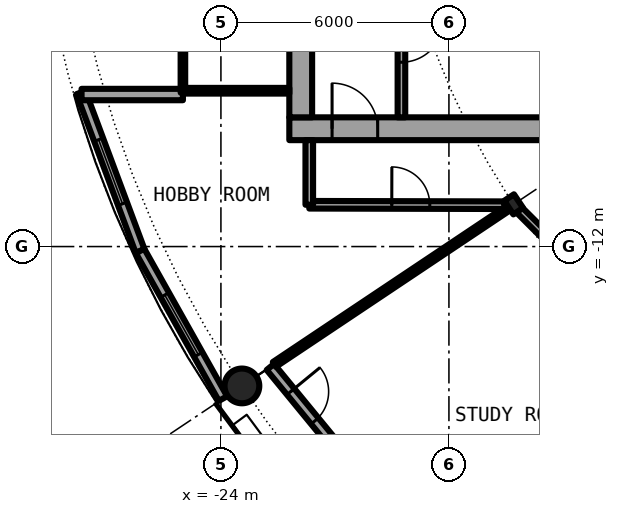
"""IFC4 building model, lengths in metres.
Left out: names, types, materials, properties, quantities, classifications, styles, units other than length and angle.
Written with IfcOpenShell. Run it as: python <this file> out.ifc"""

import sys

from ifc_helpers import new_model, si_unit, direction, frame, frame_2d, origin, origin_2d, place, context, subcontext, project, spatial, rectangle, hollow_circle, i_section, extrude, element, fill, save


model = new_model("IFC4")
c1 = context("Model", 3, precision=1e-05, world=origin(), true_north=direction((0.0, 1.0)))
c2 = subcontext(c1, "Body", "Model", "MODEL_VIEW")
j1 = project(units=[si_unit("LENGTHUNIT", "METRE"), si_unit("PLANEANGLEUNIT", "RADIAN")], contexts=[c1])
p1 = place(None, origin())
s1 = spatial("IfcSite", under=j1, at=p1, CompositionType="ELEMENT")
p2 = place(p1, origin())
s2 = spatial("IfcBuilding", under=s1, at=p2, CompositionType="ELEMENT")
p3 = place(p2, frame((0.0, 0.0, 107.45)))
s3 = spatial("IfcBuildingStorey", under=s2, at=p3, CompositionType="ELEMENT", Elevation=107.45)
p4 = place(p3, frame((-23.448, -15.667, 0.0), z_axis=(0.0, 0.0, 1.0), x_axis=(1.0, 0.0, 0.0)))
e1 = element("IfcColumn", 1, at=p4, inside=s3, PredefinedType="COLUMN", context=c2, shape_type="SweptSolid", body=[
    extrude(hollow_circle(Radius=0.457, WallThickness=0.04, at=origin_2d()), origin(), (0.0, 0.0, 1.0), 4.2),
])
p5 = place(p3, frame((-16.297, -10.889, 0.0), z_axis=(0.0, 0.0, 1.0), x_axis=(-0.831469612303, -0.55557023302, 0.0)))
e2 = element("IfcColumn", 2, at=p5, inside=s3, PredefinedType="COLUMN", context=c2, shape_type="SweptSolid", body=[
    extrude(i_section(OverallWidth=0.307, OverallDepth=0.432, WebThickness=0.021, FlangeThickness=0.04, FilletRadius=0.027, at=origin_2d()), origin(), (0.0, 0.0, 1.0), 4.2),
])
p6 = place(p3, frame((-22.699, -15.167, 0.0), z_axis=(0.0, 0.0, 1.0), x_axis=(0.634382322723, -0.773019449054, 0.0)))
e3 = element("IfcWall", 3, at=p6, inside=s3, PredefinedType="SOLIDWALL", context=c2, shape_type="SweptSolid", body=[
    extrude(rectangle(XDim=5.352, YDim=0.25, at=frame_2d((2.676, 0.0))), origin(), (0.0, 0.0, 1.0), 3.85),
])
p7 = place(p6, frame((0.841, 0.0, 0.0)))
e4 = element("IfcOpeningElement", 4, at=p7, cuts=e3, PredefinedType="OPENING", context=c2, shape_type="SweptSolid", body=[
    extrude(rectangle(XDim=1.0, YDim=2.2, at=frame_2d((0.5, 1.1))), frame((0.0, 0.135, 0.0), z_axis=(0.0, -1.0, 0.0), x_axis=(1.0, 0.0, 0.0)), (0.0, 0.0, 1.0), 0.27),
])
p8 = place(p6, frame((3.51, 0.0, 0.0)))
e5 = element("IfcOpeningElement", 5, at=p8, cuts=e3, PredefinedType="OPENING", context=c2, shape_type="SweptSolid", body=[
    extrude(rectangle(XDim=1.0, YDim=2.2, at=frame_2d((0.5, 1.1))), frame((0.0, 0.135, 0.0), z_axis=(0.0, -1.0, 0.0), x_axis=(1.0, 0.0, 0.0)), (0.0, 0.0, 1.0), 0.27),
])
p9 = place(p3, frame((-27.682, -7.945, 0.0), z_axis=(0.0, 0.0, 1.0), x_axis=(0.349247811493, -0.937030397675, 0.0)))
e6 = element("IfcWall", 6, at=p9, inside=s3, PredefinedType="SOLIDWALL", context=c2, shape_type="SweptSolid", body=[
    extrude(rectangle(XDim=4.452, YDim=0.25, at=frame_2d((2.226, 0.0))), origin(), (0.0, 0.0, 1.0), 3.85),
])
p10 = place(p9, frame((1.327, 0.0, 0.3)))
e7 = element("IfcOpeningElement", 7, at=p10, cuts=e6, PredefinedType="OPENING", context=c2, shape_type="SweptSolid", body=[
    extrude(rectangle(XDim=1.8, YDim=2.1, at=frame_2d((0.9, 1.05))), frame((0.0, 0.135, 0.0), z_axis=(0.0, -1.0, 0.0), x_axis=(1.0, 0.0, 0.0)), (0.0, 0.0, 1.0), 0.27),
])
p11 = place(p3, frame((-26.127, -12.117, 0.0), z_axis=(0.0, 0.0, 1.0), x_axis=(0.489696356642, -0.871893042919, 0.0)))
e8 = element("IfcWall", 8, at=p11, inside=s3, PredefinedType="SOLIDWALL", context=c2, shape_type="SweptSolid", body=[
    extrude(rectangle(XDim=4.454, YDim=0.25, at=frame_2d((2.227, 0.0))), origin(), (0.0, 0.0, 1.0), 3.85),
])
p12 = place(p11, frame((1.327, 0.0, 0.3)))
e9 = element("IfcOpeningElement", 9, at=p12, cuts=e8, PredefinedType="OPENING", context=c2, shape_type="SweptSolid", body=[
    extrude(rectangle(XDim=1.8, YDim=2.1, at=frame_2d((0.9, 1.05))), frame((0.0, 0.135, 0.0), z_axis=(0.0, -1.0, 0.0), x_axis=(1.0, 0.0, 0.0)), (0.0, 0.0, 1.0), 0.27),
])
p13 = place(p3, frame((-25.0, -8.0, 0.0), z_axis=(0.0, 0.0, 1.0), x_axis=(-1.0, 0.0, 0.0)))
e10 = element("IfcWall", 10, at=p13, inside=s3, PredefinedType="SOLIDWALL", context=c2, shape_type="SweptSolid", body=[
    extrude(rectangle(XDim=2.667, YDim=0.3, at=frame_2d((1.333, 0.0))), origin(), (0.0, 0.0, 1.0), 3.85),
])
p14 = place(p3, frame((-22.2, -8.9, 0.0), z_axis=(0.0, 0.0, 1.0), x_axis=(1.0, 0.0, 0.0)))
e11 = element("IfcWall", 11, at=p14, inside=s3, PredefinedType="SHEAR", context=c2, shape_type="SweptSolid", body=[
    extrude(rectangle(XDim=13.8, YDim=0.6, at=frame_2d((6.9, 0.0))), origin(), (0.0, 0.0, 1.0), 4.2),
])
p15 = place(p14, frame((1.125, 0.0, 0.0)))
e12 = element("IfcOpeningElement", 12, at=p15, cuts=e11, PredefinedType="OPENING", context=c2, shape_type="SweptSolid", body=[
    extrude(rectangle(XDim=1.2, YDim=2.3, at=frame_2d((0.6, 1.15))), frame((0.0, 0.31, 0.0), z_axis=(0.0, -1.0, 0.0), x_axis=(1.0, 0.0, 0.0)), (0.0, 0.0, 1.0), 0.62),
])
p16 = place(p3, frame((-21.9, -8.6, 0.0), z_axis=(0.0, 0.0, 1.0), x_axis=(0.0, 1.0, 0.0)))
e13 = element("IfcWall", 13, at=p16, inside=s3, PredefinedType="SHEAR", context=c2, shape_type="SweptSolid", body=[
    extrude(rectangle(XDim=17.2, YDim=0.6, at=frame_2d((8.6, 0.0))), origin(), (0.0, 0.0, 1.0), 4.2),
])
p17 = place(p16, frame((7.7, 0.0, 0.0)))
e14 = element("IfcOpeningElement", 14, at=p17, cuts=e13, PredefinedType="OPENING", context=c2, shape_type="SweptSolid", body=[
    extrude(rectangle(XDim=1.8, YDim=2.3, at=frame_2d((0.9, 1.15))), frame((0.0, 0.31, 0.0), z_axis=(0.0, -1.0, 0.0), x_axis=(1.0, 0.0, 0.0)), (0.0, 0.0, 1.0), 0.62),
])
p18 = place(p3, frame((-19.25, -1.575, 0.0), z_axis=(0.0, 0.0, 1.0), x_axis=(0.0, -1.0, 0.0)))
e15 = element("IfcWall", 15, at=p18, inside=s3, PredefinedType="SOLIDWALL", context=c2, shape_type="SweptSolid", body=[
    extrude(rectangle(XDim=7.025, YDim=0.2, at=frame_2d((3.513, 0.0))), origin(), (0.0, 0.0, 1.0), 3.85),
])
p19 = place(p18, frame((4.475, 0.0, 0.0)))
e16 = element("IfcOpeningElement", 16, at=p19, cuts=e15, PredefinedType="OPENING", context=c2, shape_type="SweptSolid", body=[
    extrude(rectangle(XDim=1.1, YDim=2.3, at=frame_2d((0.55, 1.15))), frame((0.0, 0.11, 0.0), z_axis=(0.0, -1.0, 0.0), x_axis=(1.0, 0.0, 0.0)), (0.0, 0.0, 1.0), 0.22),
])
p20 = place(p3, frame((-22.2, -7.9, 0.0), z_axis=(0.0, 0.0, 1.0), x_axis=(-1.0, 0.0, 0.0)))
e17 = element("IfcWall", 17, at=p20, inside=s3, PredefinedType="PARTITIONING", context=c2, shape_type="SweptSolid", body=[
    extrude(rectangle(XDim=2.74, YDim=0.15, at=frame_2d((1.37, 0.0))), origin(), (0.0, 0.0, 1.0), 3.85),
])
p21 = place(p3, frame((-25.0, 7.95, 0.0), z_axis=(0.0, 0.0, 1.0), x_axis=(0.0, -1.0, 0.0)))
e18 = element("IfcWall", 18, at=p21, inside=s3, PredefinedType="PARTITIONING", context=c2, shape_type="SweptSolid", body=[
    extrude(rectangle(XDim=15.9, YDim=0.12, at=frame_2d((7.95, 0.0))), origin(), (0.0, 0.0, 1.0), 3.85),
])
p22 = place(p21, frame((0.95, 0.0, 0.1)))
e19 = element("IfcOpeningElement", 19, at=p22, cuts=e18, PredefinedType="OPENING", context=c2, shape_type="SweptSolid", body=[
    extrude(rectangle(XDim=14.0, YDim=3.5, at=frame_2d((7.0, 1.75))), frame((0.0, 0.07, 0.0), z_axis=(0.0, -1.0, 0.0), x_axis=(1.0, 0.0, 0.0)), (0.0, 0.0, 1.0), 0.14),
])
p23 = place(p3, frame((-16.186, -11.0, 0.0), z_axis=(0.0, 0.0, 1.0), x_axis=(0.707106781187, -0.707106781187, 0.0)))
e20 = element("IfcWall", 20, at=p23, inside=s3, PredefinedType="PARTITIONING", context=c2, shape_type="SweptSolid", body=[
    extrude(rectangle(XDim=7.334, YDim=0.2, at=frame_2d((3.667, 0.0))), origin(), (0.0, 0.0, 1.0), 3.54),
])
p24 = place(p23, frame((3.167, 0.0, 0.0)))
e21 = element("IfcOpeningElement", 21, at=p24, cuts=e20, PredefinedType="OPENING", context=c2, shape_type="SweptSolid", body=[
    extrude(rectangle(XDim=1.0, YDim=2.3, at=frame_2d((0.5, 1.15))), frame((0.0, 0.11, 0.0), z_axis=(0.0, -1.0, 0.0), x_axis=(1.0, 0.0, 0.0)), (0.0, 0.0, 1.0), 0.22),
])
p25 = place(p3, frame((-21.675, -10.9, 0.0), z_axis=(0.0, 0.0, 1.0), x_axis=(0.999997173357, -0.002377662213, 0.0)))
e22 = element("IfcWall", 22, at=p25, inside=s3, PredefinedType="PARTITIONING", context=c2, shape_type="SweptSolid", body=[
    extrude(rectangle(XDim=5.134, YDim=0.2, at=frame_2d((2.567, 0.0))), origin(), (0.0, 0.0, 1.0), 3.85),
])
p26 = place(p25, frame((2.171, 0.0, 0.0)))
e23 = element("IfcOpeningElement", 23, at=p26, cuts=e22, PredefinedType="OPENING", context=c2, shape_type="SweptSolid", body=[
    extrude(rectangle(XDim=1.0, YDim=2.3, at=frame_2d((0.5, 1.15))), frame((0.0, 0.11, 0.0), z_axis=(0.0, -1.0, 0.0), x_axis=(1.0, 0.0, 0.0)), (0.0, 0.0, 1.0), 0.22),
])
p27 = place(p3, frame((-22.593, -15.101, 0.0), z_axis=(0.0, 0.0, 1.0), x_axis=(0.83143223768, 0.555626164023, 0.0)))
e24 = element("IfcWall", 24, at=p27, inside=s3, PredefinedType="PARTITIONING", context=c2, shape_type="SweptSolid", body=[
    extrude(rectangle(XDim=7.359, YDim=0.15, at=frame_2d((3.68, 0.0))), origin(), (0.0, 0.0, 1.0), 3.85),
])
p28 = place(p3, frame((-21.675, -10.9, 0.0), z_axis=(0.0, 0.0, 1.0), x_axis=(0.0, 1.0, 0.0)))
e25 = element("IfcWall", 25, at=p28, inside=s3, PredefinedType="PARTITIONING", context=c2, shape_type="SweptSolid", body=[
    extrude(rectangle(XDim=1.7, YDim=0.2, at=frame_2d((0.85, 0.0))), origin(), (0.0, 0.0, 1.0), 3.85),
])
p29 = place(p7, origin())
e26 = element("IfcDoor", 26, at=p29, inside=s3, OperationType="SINGLE_SWING_LEFT", PredefinedType="DOOR", context=c2, shape_type="SweptSolid", body=[
    extrude(rectangle(XDim=1.0, YDim=2.2, at=frame_2d((0.5, 1.1))), frame((0.0, 0.025, 0.0), z_axis=(0.0, -1.0, 0.0), x_axis=(1.0, 0.0, 0.0)), (0.0, 0.0, 1.0), 0.05),
])
fill(e4, e26)
p30 = place(p10, origin())
e27 = element("IfcWindow", 27, at=p30, inside=s3, PartitioningType="SINGLE_PANEL", PredefinedType="WINDOW", context=c2, shape_type="SweptSolid", body=[
    extrude(rectangle(XDim=1.8, YDim=2.1, at=frame_2d((0.9, 1.05))), frame((0.0, 0.03, 0.0), z_axis=(0.0, -1.0, 0.0), x_axis=(1.0, 0.0, 0.0)), (0.0, 0.0, 1.0), 0.06),
])
fill(e7, e27)
p31 = place(p12, origin())
e28 = element("IfcWindow", 28, at=p31, inside=s3, PartitioningType="SINGLE_PANEL", PredefinedType="WINDOW", context=c2, shape_type="SweptSolid", body=[
    extrude(rectangle(XDim=1.8, YDim=2.1, at=frame_2d((0.9, 1.05))), frame((0.0, 0.03, 0.0), z_axis=(0.0, -1.0, 0.0), x_axis=(1.0, 0.0, 0.0)), (0.0, 0.0, 1.0), 0.06),
])
fill(e9, e28)
p32 = place(p19, origin())
e29 = element("IfcDoor", 29, at=p32, inside=s3, OperationType="SINGLE_SWING_LEFT", PredefinedType="DOOR", context=c2, shape_type="SweptSolid", body=[
    extrude(rectangle(XDim=1.1, YDim=2.3, at=frame_2d((0.55, 1.15))), frame((0.0, 0.025, 0.0), z_axis=(0.0, -1.0, 0.0), x_axis=(1.0, 0.0, 0.0)), (0.0, 0.0, 1.0), 0.05),
])
fill(e16, e29)
p33 = place(p15, origin())
e30 = element("IfcDoor", 30, at=p33, inside=s3, OperationType="SINGLE_SWING_RIGHT", PredefinedType="DOOR", context=c2, shape_type="SweptSolid", body=[
    extrude(rectangle(XDim=1.2, YDim=2.3, at=frame_2d((0.6, 1.15))), frame((0.0, 0.025, 0.0), z_axis=(0.0, -1.0, 0.0), x_axis=(1.0, 0.0, 0.0)), (0.0, 0.0, 1.0), 0.05),
])
fill(e12, e30)
p34 = place(p22, origin())
e31 = element("IfcWindow", 31, at=p34, inside=s3, PartitioningType="SINGLE_PANEL", PredefinedType="WINDOW", context=c2, shape_type="SweptSolid", body=[
    extrude(rectangle(XDim=14.0, YDim=3.5, at=frame_2d((7.0, 1.75))), frame((0.0, 0.03, 0.0), z_axis=(0.0, -1.0, 0.0), x_axis=(1.0, 0.0, 0.0)), (0.0, 0.0, 1.0), 0.06),
])
fill(e19, e31)
p35 = place(p26, origin())
e32 = element("IfcDoor", 32, at=p35, inside=s3, OperationType="SINGLE_SWING_RIGHT", PredefinedType="DOOR", context=c2, shape_type="SweptSolid", body=[
    extrude(rectangle(XDim=1.0, YDim=2.3, at=frame_2d((0.5, 1.15))), frame((0.0, 0.025, 0.0), z_axis=(0.0, -1.0, 0.0), x_axis=(1.0, 0.0, 0.0)), (0.0, 0.0, 1.0), 0.05),
])
fill(e23, e32)
save(model, sys.argv[1])
